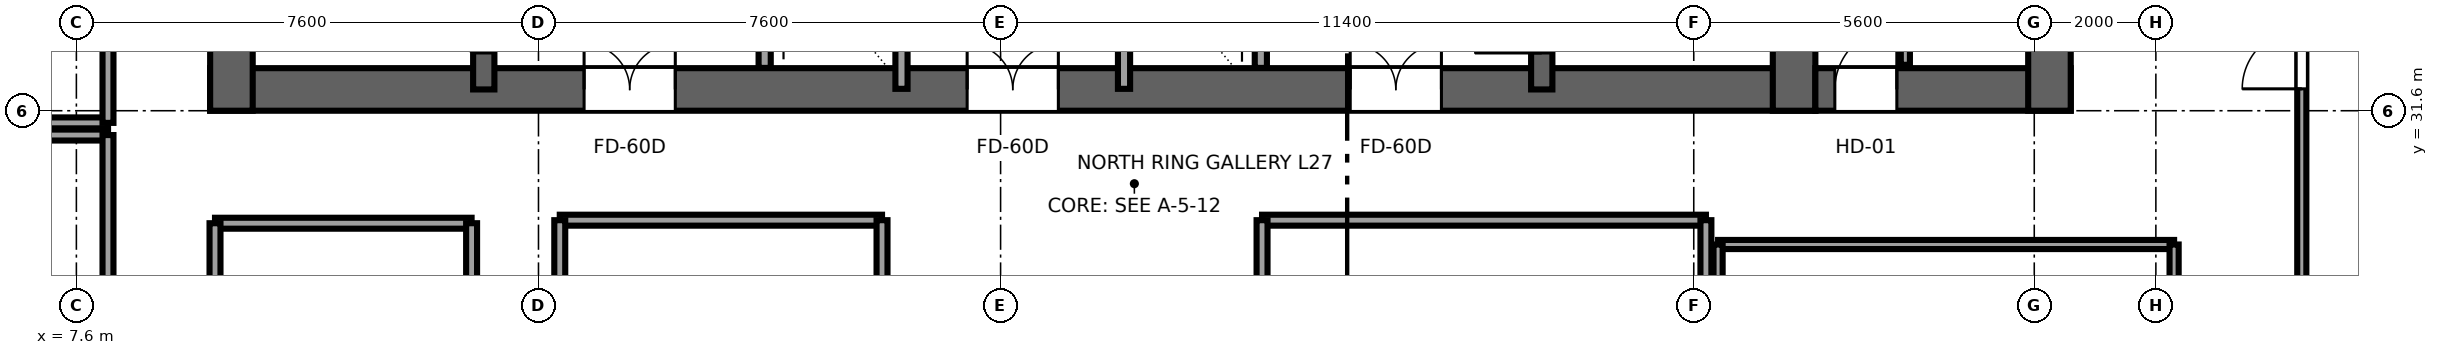
"""IFC4 building model, lengths in metres.
Left out: names, types, materials, properties, quantities, classifications, styles, units other than length and angle.
Written with IfcOpenShell. Run it as: python <this file> out.ifc"""

import sys

from ifc_helpers import new_model, si_unit, direction, frame, frame_2d, origin, place, context, subcontext, project, spatial, rectangle, extrude, source, transform, mapped, element, fill, save


model = new_model("IFC4")
c1 = context("Model", 3, precision=1e-05, world=origin(), true_north=direction((0.0, 1.0)))
c2 = subcontext(c1, "Body", "Model", "MODEL_VIEW")
j1 = project(units=[si_unit("LENGTHUNIT", "METRE"), si_unit("PLANEANGLEUNIT", "RADIAN")], contexts=[c1])
p1 = place(None, origin())
s1 = spatial("IfcSite", under=j1, at=p1, CompositionType="ELEMENT")
p2 = place(p1, origin())
s2 = spatial("IfcBuilding", under=s1, at=p2, CompositionType="ELEMENT")
p3 = place(p2, frame((0.0, 0.0, 108.0)))
s3 = spatial("IfcBuildingStorey", under=s2, at=p3, CompositionType="ELEMENT", Elevation=108.0)
p4 = place(p3, frame((9.8, 31.95, 0.0), z_axis=(0.0, 0.0, 1.0), x_axis=(1.0, 0.0, 0.0)))
e1 = element("IfcWall", 1, at=p4, inside=s3, PredefinedType="SHEAR", context=c2, shape_type="SweptSolid", body=[
    extrude(rectangle(XDim=26.4, YDim=0.7, at=frame_2d((13.2, 0.0))), origin(), (0.0, 0.0, 1.0), 3.55),
])
p5 = place(p4, frame((7.65, 0.0, 0.0), z_axis=(0.0, 0.0, 1.0), x_axis=(-1.0, 0.0, 0.0)))
e2 = element("IfcOpeningElement", 2, at=p5, cuts=e1, PredefinedType="OPENING", context=c2, shape_type="SweptSolid", body=[
    extrude(rectangle(XDim=1.5, YDim=2.04, at=frame_2d((0.75, 1.02))), frame((0.0, 0.36, 0.0), z_axis=(0.0, -1.0, 0.0), x_axis=(1.0, 0.0, 0.0)), (0.0, 0.0, 1.0), 0.72),
])
p6 = place(p4, frame((13.95, 0.0, 0.0), z_axis=(0.0, 0.0, 1.0), x_axis=(-1.0, 0.0, 0.0)))
e3 = element("IfcOpeningElement", 3, at=p6, cuts=e1, PredefinedType="OPENING", context=c2, shape_type="SweptSolid", body=[
    extrude(rectangle(XDim=1.5, YDim=2.04, at=frame_2d((0.75, 1.02))), frame((0.0, 0.36, 0.0), z_axis=(0.0, -1.0, 0.0), x_axis=(1.0, 0.0, 0.0)), (0.0, 0.0, 1.0), 0.72),
])
p7 = place(p4, frame((20.25, 0.0, 0.0), z_axis=(0.0, 0.0, 1.0), x_axis=(-1.0, 0.0, 0.0)))
e4 = element("IfcOpeningElement", 4, at=p7, cuts=e1, PredefinedType="OPENING", context=c2, shape_type="SweptSolid", body=[
    extrude(rectangle(XDim=1.5, YDim=2.04, at=frame_2d((0.75, 1.02))), frame((0.0, 0.36, 0.0), z_axis=(0.0, -1.0, 0.0), x_axis=(1.0, 0.0, 0.0)), (0.0, 0.0, 1.0), 0.72),
])
for number, where, z_axis, x_axis in (
    (5, (10.15, 31.6, 0.0), (0.0, 0.0, 1.0), (0.0, 1.0, 0.0)),
    (6, (35.85, 31.6, 0.0), (0.0, 0.0, 1.0), (0.0, 1.0, 0.0)),
):
    element("IfcWall", number, at=place(p3, frame(where, z_axis=z_axis, x_axis=x_axis)), inside=s3, PredefinedType="SHEAR", context=c2, shape_type="SweptSolid", body=[
        extrude(rectangle(XDim=13.6, YDim=0.7, at=frame_2d((6.8, 0.0))), origin(), (0.0, 0.0, 1.0), 3.55),
    ])
p8 = place(p3, frame((14.3, 31.95, 0.0), z_axis=(0.0, 0.0, 1.0), x_axis=(0.0, 1.0, 0.0)))
e7 = element("IfcWall", 7, at=p8, inside=s3, PredefinedType="SHEAR", context=c2, shape_type="SweptSolid", body=[
    extrude(rectangle(XDim=12.9, YDim=0.35, at=frame_2d((6.45, 0.0))), origin(), (0.0, 0.0, 1.0), 3.55),
])
p9 = place(p8, frame((0.6, 0.0, 0.0)))
e8 = element("IfcOpeningElement", 8, at=p9, cuts=e7, PredefinedType="OPENING", context=c2, shape_type="SweptSolid", body=[
    extrude(rectangle(XDim=1.1, YDim=2.12, at=frame_2d((0.55, 1.06))), frame((0.0, 0.185, 0.0), z_axis=(0.0, -1.0, 0.0), x_axis=(1.0, 0.0, 0.0)), (0.0, 0.0, 1.0), 0.37),
])
p10 = place(p3, frame((31.7, 31.95, 0.0), z_axis=(0.0, 0.0, 1.0), x_axis=(0.0, 1.0, 0.0)))
e9 = element("IfcWall", 9, at=p10, inside=s3, PredefinedType="SHEAR", context=c2, shape_type="SweptSolid", body=[
    extrude(rectangle(XDim=12.9, YDim=0.35, at=frame_2d((6.45, 0.0))), origin(), (0.0, 0.0, 1.0), 3.55),
])
p11 = place(p10, frame((1.7, 0.0, 0.0), z_axis=(0.0, 0.0, 1.0), x_axis=(-1.0, 0.0, 0.0)))
e10 = element("IfcOpeningElement", 10, at=p11, cuts=e9, PredefinedType="OPENING", context=c2, shape_type="SweptSolid", body=[
    extrude(rectangle(XDim=1.1, YDim=2.12, at=frame_2d((0.55, 1.06))), frame((0.0, 0.185, 0.0), z_axis=(0.0, -1.0, 0.0), x_axis=(1.0, 0.0, 0.0)), (0.0, 0.0, 1.0), 0.37),
])
p12 = place(p3, frame((36.2, 31.95, 0.0), z_axis=(0.0, 0.0, 1.0), x_axis=(1.0, 0.0, 0.0)))
e11 = element("IfcWall", 11, at=p12, inside=s3, PredefinedType="SHEAR", context=c2, shape_type="SweptSolid", body=[
    extrude(rectangle(XDim=4.2, YDim=0.7, at=frame_2d((2.1, 0.0))), origin(), (0.0, 0.0, 1.0), 3.55),
])
p13 = place(p12, frame((1.34, 0.0, 0.0), z_axis=(0.0, 0.0, 1.0), x_axis=(-1.0, 0.0, 0.0)))
e12 = element("IfcOpeningElement", 12, at=p13, cuts=e11, PredefinedType="OPENING", context=c2, shape_type="SweptSolid", body=[
    extrude(rectangle(XDim=1.02, YDim=2.03, at=frame_2d((0.51, 1.015))), frame((0.0, 0.36, 0.0), z_axis=(0.0, -1.0, 0.0), x_axis=(1.0, 0.0, 0.0)), (0.0, 0.0, 1.0), 0.72),
])
p14 = place(p3, frame((40.05, 31.6, 0.0), z_axis=(0.0, 0.0, 1.0), x_axis=(0.0, 1.0, 0.0)))
e13 = element("IfcWall", 13, at=p14, inside=s3, PredefinedType="SHEAR", context=c2, shape_type="SweptSolid", body=[
    extrude(rectangle(XDim=13.6, YDim=0.7, at=frame_2d((6.8, 0.0))), origin(), (0.0, 0.0, 1.0), 3.55),
])
for number, where, z_axis, x_axis in (
    (14, (18.92, 32.304, 0.0), (0.0, 0.0, 1.0), (0.0, 1.0, 0.0)),
    (15, (27.08, 32.304, 0.0), (0.0, 0.0, 1.0), (0.0, 1.0, 0.0)),
):
    element("IfcWall", number, at=place(p3, frame(where, z_axis=z_axis, x_axis=x_axis)), inside=s3, PredefinedType="SOLIDWALL", context=c2, shape_type="SweptSolid", body=[
        extrude(rectangle(XDim=3.846, YDim=0.2, at=frame_2d((1.923, 0.0))), origin(), (0.0, 0.0, 1.0), 3.37),
    ])
p15 = place(p3, frame((21.17, 31.96, 0.0), z_axis=(0.0, 0.0, 1.0), x_axis=(0.0, 1.0, 0.0)))
e16 = element("IfcWall", 16, at=p15, inside=s3, PredefinedType="SOLIDWALL", context=c2, shape_type="SweptSolid", body=[
    extrude(rectangle(XDim=12.58, YDim=0.2, at=frame_2d((6.29, 0.0))), origin(), (0.0, 0.0, 1.0), 3.37),
])
p16 = place(p15, frame((5.74, 0.0, 0.0)))
e17 = element("IfcOpeningElement", 17, at=p16, cuts=e16, PredefinedType="OPENING", context=c2, shape_type="SweptSolid", body=[
    extrude(rectangle(XDim=1.1, YDim=2.12, at=frame_2d((0.55, 1.06))), frame((0.0, 0.11, 0.0), z_axis=(0.0, -1.0, 0.0), x_axis=(1.0, 0.0, 0.0)), (0.0, 0.0, 1.0), 0.22),
])
p17 = place(p15, frame((8.24, 0.0, 0.0)))
e18 = element("IfcOpeningElement", 18, at=p17, cuts=e16, PredefinedType="OPENING", context=c2, shape_type="SweptSolid", body=[
    extrude(rectangle(XDim=1.1, YDim=2.12, at=frame_2d((0.55, 1.06))), frame((0.0, 0.11, 0.0), z_axis=(0.0, -1.0, 0.0), x_axis=(1.0, 0.0, 0.0)), (0.0, 0.0, 1.0), 0.22),
])
p18 = place(p3, frame((24.83, 31.96, 0.0), z_axis=(0.0, 0.0, 1.0), x_axis=(0.0, 1.0, 0.0)))
e19 = element("IfcWall", 19, at=p18, inside=s3, PredefinedType="SOLIDWALL", context=c2, shape_type="SweptSolid", body=[
    extrude(rectangle(XDim=12.58, YDim=0.2, at=frame_2d((6.29, 0.0))), origin(), (0.0, 0.0, 1.0), 3.37),
])
p19 = place(p18, frame((5.74, 0.0, 0.0)))
e20 = element("IfcOpeningElement", 20, at=p19, cuts=e19, PredefinedType="OPENING", context=c2, shape_type="SweptSolid", body=[
    extrude(rectangle(XDim=1.1, YDim=2.12, at=frame_2d((0.55, 1.06))), frame((0.0, 0.11, 0.0), z_axis=(0.0, -1.0, 0.0), x_axis=(1.0, 0.0, 0.0)), (0.0, 0.0, 1.0), 0.22),
])
p20 = place(p18, frame((8.24, 0.0, 0.0)))
e21 = element("IfcOpeningElement", 21, at=p20, cuts=e19, PredefinedType="OPENING", context=c2, shape_type="SweptSolid", body=[
    extrude(rectangle(XDim=1.1, YDim=2.12, at=frame_2d((0.55, 1.06))), frame((0.0, 0.11, 0.0), z_axis=(0.0, -1.0, 0.0), x_axis=(1.0, 0.0, 0.0)), (0.0, 0.0, 1.0), 0.22),
])
p21 = place(p3, frame((37.68, 32.355, 0.0), z_axis=(0.0, 0.0, 1.0), x_axis=(0.0, 1.0, 0.0)))
e22 = element("IfcWall", 22, at=p21, inside=s3, PredefinedType="PARTITIONING", context=c2, shape_type="SweptSolid", body=[
    extrude(rectangle(XDim=5.845, YDim=0.15, at=frame_2d((2.922, 0.0))), origin(), (0.0, 0.0, 1.0), 3.37),
])
p22 = place(p21, frame((2.413, 0.0, 0.0)))
e23 = element("IfcOpeningElement", 23, at=p22, cuts=e22, PredefinedType="OPENING", context=c2, shape_type="SweptSolid", body=[
    extrude(rectangle(XDim=1.02, YDim=2.03, at=frame_2d((0.51, 1.015))), frame((0.0, 0.085, 0.0), z_axis=(0.0, -1.0, 0.0), x_axis=(1.0, 0.0, 0.0)), (0.0, 0.0, 1.0), 0.17),
])
p23 = place(p3, frame((0.405, 31.2, 0.0), z_axis=(0.0, 0.0, 1.0), x_axis=(1.0, 0.0, 0.0)))
e24 = element("IfcWall", 24, at=p23, inside=s3, PredefinedType="PARTITIONING", context=c2, shape_type="SweptSolid", body=[
    extrude(rectangle(XDim=7.715, YDim=0.18, at=frame_2d((3.857, 0.0))), origin(), (0.0, 0.0, 1.0), 3.37),
])
p24 = place(p3, frame((8.12, 23.3, 0.0), z_axis=(0.0, 0.0, 1.0), x_axis=(0.0, 1.0, 0.0)))
e25 = element("IfcWall", 25, at=p24, inside=s3, PredefinedType="PARTITIONING", context=c2, shape_type="SweptSolid", body=[
    extrude(rectangle(XDim=7.9, YDim=0.18, at=frame_2d((3.95, 0.0))), origin(), (0.0, 0.0, 1.0), 3.37),
])
p25 = place(p24, frame((3.125, 0.0, 0.0)))
e26 = element("IfcOpeningElement", 26, at=p25, cuts=e25, PredefinedType="OPENING", context=c2, shape_type="SweptSolid", body=[
    extrude(rectangle(XDim=1.65, YDim=2.15, at=frame_2d((0.825, 1.075))), frame((0.0, 0.1, 0.0), z_axis=(0.0, -1.0, 0.0), x_axis=(1.0, 0.0, 0.0)), (0.0, 0.0, 1.0), 0.2),
])
p26 = place(p3, frame((0.405, 31.4, 0.0), z_axis=(0.0, 0.0, 1.0), x_axis=(1.0, 0.0, 0.0)))
e27 = element("IfcWall", 27, at=p26, inside=s3, PredefinedType="PARTITIONING", context=c2, shape_type="SweptSolid", body=[
    extrude(rectangle(XDim=7.715, YDim=0.18, at=frame_2d((3.857, 0.0))), origin(), (0.0, 0.0, 1.0), 3.37),
])
p27 = place(p3, frame((8.12, 31.4, 0.0), z_axis=(0.0, 0.0, 1.0), x_axis=(0.0, 1.0, 0.0)))
e28 = element("IfcWall", 28, at=p27, inside=s3, PredefinedType="PARTITIONING", context=c2, shape_type="SweptSolid", body=[
    extrude(rectangle(XDim=6.8, YDim=0.18, at=frame_2d((3.4, 0.0))), origin(), (0.0, 0.0, 1.0), 3.37),
])
p28 = place(p27, frame((3.175, 0.0, 0.0)))
e29 = element("IfcOpeningElement", 29, at=p28, cuts=e28, PredefinedType="OPENING", context=c2, shape_type="SweptSolid", body=[
    extrude(rectangle(XDim=1.65, YDim=2.15, at=frame_2d((0.825, 1.075))), frame((0.0, 0.1, 0.0), z_axis=(0.0, -1.0, 0.0), x_axis=(1.0, 0.0, 0.0)), (0.0, 0.0, 1.0), 0.2),
])
p29 = place(p3, frame((44.2, 27.38, 0.0), z_axis=(0.0, 0.0, 1.0), x_axis=(0.0, 1.0, 0.0)))
e30 = element("IfcWall", 30, at=p29, inside=s3, PredefinedType="PARTITIONING", context=c2, shape_type="SweptSolid", body=[
    extrude(rectangle(XDim=10.14, YDim=0.15, at=frame_2d((5.07, 0.0))), origin(), (0.0, 0.0, 1.0), 3.37),
])
p30 = place(p29, frame((4.58, 0.0, 0.0)))
e31 = element("IfcOpeningElement", 31, at=p30, cuts=e30, PredefinedType="OPENING", context=c2, shape_type="SweptSolid", body=[
    extrude(rectangle(XDim=0.98, YDim=2.12, at=frame_2d((0.49, 1.06))), frame((0.0, 0.085, 0.0), z_axis=(0.0, -1.0, 0.0), x_axis=(1.0, 0.0, 0.0)), (0.0, 0.0, 1.0), 0.17),
])
p31 = place(p3, frame((9.88, 29.75, 0.0), z_axis=(0.0, 0.0, 1.0), x_axis=(1.0, 0.0, 0.0)))
e32 = element("IfcWall", 32, at=p31, inside=s3, PredefinedType="PARTITIONING", context=c2, shape_type="SweptSolid", body=[
    extrude(rectangle(XDim=4.22, YDim=0.18, at=frame_2d((2.11, 0.0))), origin(), (0.0, 0.0, 1.0), 3.37),
])
for number, where, z_axis, x_axis in (
    (33, (9.88, 23.3, 0.0), (0.0, 0.0, 1.0), (0.0, 1.0, 0.0)),
    (34, (14.1, 23.3, 0.0), (0.0, 0.0, 1.0), (0.0, 1.0, 0.0)),
):
    element("IfcWall", number, at=place(p3, frame(where, z_axis=z_axis, x_axis=x_axis)), inside=s3, PredefinedType="PARTITIONING", context=c2, shape_type="SweptSolid", body=[
        extrude(rectangle(XDim=6.45, YDim=0.18, at=frame_2d((3.225, 0.0))), origin(), (0.0, 0.0, 1.0), 3.37),
    ])
p32 = place(p3, frame((27.1, 29.8, 0.0), z_axis=(0.0, 0.0, 1.0), x_axis=(1.0, 0.0, 0.0)))
e35 = element("IfcWall", 35, at=p32, inside=s3, PredefinedType="PARTITIONING", context=c2, shape_type="SweptSolid", body=[
    extrude(rectangle(XDim=7.3, YDim=0.18, at=frame_2d((3.65, 0.0))), origin(), (0.0, 0.0, 1.0), 3.37),
])
for number, where, z_axis, x_axis in (
    (36, (27.1, 23.3, 0.0), (0.0, 0.0, 1.0), (0.0, 1.0, 0.0)),
    (37, (34.4, 23.3, 0.0), (0.0, 0.0, 1.0), (0.0, 1.0, 0.0)),
):
    element("IfcWall", number, at=place(p3, frame(where, z_axis=z_axis, x_axis=x_axis)), inside=s3, PredefinedType="PARTITIONING", context=c2, shape_type="SweptSolid", body=[
        extrude(rectangle(XDim=6.5, YDim=0.18, at=frame_2d((3.25, 0.0))), origin(), (0.0, 0.0, 1.0), 3.37),
    ])
p33 = place(p3, frame((15.55, 29.8, 0.0), z_axis=(0.0, 0.0, 1.0), x_axis=(1.0, 0.0, 0.0)))
e38 = element("IfcWall", 38, at=p33, inside=s3, PredefinedType="PARTITIONING", context=c2, shape_type="SweptSolid", body=[
    extrude(rectangle(XDim=5.3, YDim=0.18, at=frame_2d((2.65, 0.0))), origin(), (0.0, 0.0, 1.0), 3.37),
])
for number, where, z_axis, x_axis in (
    (39, (15.55, 23.3, 0.0), (0.0, 0.0, 1.0), (0.0, 1.0, 0.0)),
    (40, (20.85, 23.3, 0.0), (0.0, 0.0, 1.0), (0.0, 1.0, 0.0)),
):
    element("IfcWall", number, at=place(p3, frame(where, z_axis=z_axis, x_axis=x_axis)), inside=s3, PredefinedType="PARTITIONING", context=c2, shape_type="SweptSolid", body=[
        extrude(rectangle(XDim=6.5, YDim=0.18, at=frame_2d((3.25, 0.0))), origin(), (0.0, 0.0, 1.0), 3.37),
    ])
p34 = place(p3, frame((34.6, 29.4, 0.0), z_axis=(0.0, 0.0, 1.0), x_axis=(1.0, 0.0, 0.0)))
e41 = element("IfcWall", 41, at=p34, inside=s3, PredefinedType="PARTITIONING", context=c2, shape_type="SweptSolid", body=[
    extrude(rectangle(XDim=7.5, YDim=0.15, at=frame_2d((3.75, 0.0))), origin(), (0.0, 0.0, 1.0), 3.37),
])
p35 = place(p3, frame((34.6, 23.3, 0.0), z_axis=(0.0, 0.0, 1.0), x_axis=(0.0, 1.0, 0.0)))
e42 = element("IfcWall", 42, at=p35, inside=s3, PredefinedType="PARTITIONING", context=c2, shape_type="SweptSolid", body=[
    extrude(rectangle(XDim=6.1, YDim=0.15, at=frame_2d((3.05, 0.0))), origin(), (0.0, 0.0, 1.0), 3.37),
])
p36 = place(p3, frame((42.1, 23.3, 0.0), z_axis=(0.0, 0.0, 1.0), x_axis=(0.0, 1.0, 0.0)))
e43 = element("IfcWall", 43, at=p36, inside=s3, PredefinedType="PARTITIONING", context=c2, shape_type="SweptSolid", body=[
    extrude(rectangle(XDim=6.1, YDim=0.15, at=frame_2d((3.05, 0.0))), origin(), (0.0, 0.0, 1.0), 2.16),
])
m1 = source(origin(), c2, "Body", "SweptSolid", [
    extrude(rectangle(XDim=1.1, YDim=2.12, at=frame_2d((0.55, 1.06))), frame((0.0, 0.025, 0.0), z_axis=(0.0, -1.0, 0.0), x_axis=(1.0, 0.0, 0.0)), (0.0, 0.0, 1.0), 0.05),
])
p37 = place(p9, origin())
e44 = element("IfcDoor", 44, at=p37, inside=s3, OperationType="SINGLE_SWING_RIGHT", PredefinedType="DOOR", context=c2, shape_type="MappedRepresentation", body=[
    mapped(m1, transform((0.0, 0.0, 0.0), x_axis=(1.0, 0.0, 0.0), y_axis=(0.0, 1.0, 0.0), z_axis=(0.0, 0.0, 1.0), scale=1.0)),
])
fill(e8, e44)
p38 = place(p11, origin())
e45 = element("IfcDoor", 45, at=p38, inside=s3, OperationType="SINGLE_SWING_LEFT", PredefinedType="DOOR", context=c2, shape_type="MappedRepresentation", body=[
    mapped(m1, transform((0.0, 0.0, 0.0), x_axis=(1.0, 0.0, 0.0), y_axis=(0.0, 1.0, 0.0), z_axis=(0.0, 0.0, 1.0), scale=1.0)),
])
fill(e10, e45)
m2 = source(origin(), c2, "Body", "SweptSolid", [
    extrude(rectangle(XDim=1.5, YDim=2.04, at=frame_2d((0.75, 1.02))), frame((0.0, 0.025, 0.0), z_axis=(0.0, -1.0, 0.0), x_axis=(1.0, 0.0, 0.0)), (0.0, 0.0, 1.0), 0.05),
])
p39 = place(p5, origin())
e46 = element("IfcDoor", 46, at=p39, inside=s3, OperationType="DOUBLE_DOOR_SINGLE_SWING", PredefinedType="DOOR", context=c2, shape_type="MappedRepresentation", body=[
    mapped(m2, transform((0.0, 0.0, 0.0), x_axis=(1.0, 0.0, 0.0), y_axis=(0.0, 1.0, 0.0), z_axis=(0.0, 0.0, 1.0), scale=1.0)),
])
fill(e2, e46)
p40 = place(p6, origin())
e47 = element("IfcDoor", 47, at=p40, inside=s3, OperationType="DOUBLE_DOOR_SINGLE_SWING", PredefinedType="DOOR", context=c2, shape_type="MappedRepresentation", body=[
    mapped(m2, transform((0.0, 0.0, 0.0), x_axis=(1.0, 0.0, 0.0), y_axis=(0.0, 1.0, 0.0), z_axis=(0.0, 0.0, 1.0), scale=1.0)),
])
fill(e3, e47)
p41 = place(p7, origin())
e48 = element("IfcDoor", 48, at=p41, inside=s3, OperationType="DOUBLE_DOOR_SINGLE_SWING", PredefinedType="DOOR", context=c2, shape_type="MappedRepresentation", body=[
    mapped(m2, transform((0.0, 0.0, 0.0), x_axis=(1.0, 0.0, 0.0), y_axis=(0.0, 1.0, 0.0), z_axis=(0.0, 0.0, 1.0), scale=1.0)),
])
fill(e4, e48)
m3 = source(origin(), c2, "Body", "SweptSolid", [
    extrude(rectangle(XDim=1.02, YDim=2.03, at=frame_2d((0.51, 1.015))), frame((0.0, 0.025, 0.0), z_axis=(0.0, -1.0, 0.0), x_axis=(1.0, 0.0, 0.0)), (0.0, 0.0, 1.0), 0.05),
])
p42 = place(p13, origin())
e49 = element("IfcDoor", 49, at=p42, inside=s3, OperationType="SINGLE_SWING_RIGHT", PredefinedType="DOOR", context=c2, shape_type="MappedRepresentation", body=[
    mapped(m3, transform((0.0, 0.0, 0.0), x_axis=(1.0, 0.0, 0.0), y_axis=(0.0, 1.0, 0.0), z_axis=(0.0, 0.0, 1.0), scale=1.0)),
])
fill(e12, e49)
m4 = source(origin(), c2, "Body", "SweptSolid", [
    extrude(rectangle(XDim=0.98, YDim=2.12, at=frame_2d((0.49, 1.06))), frame((0.0, 0.025, 0.0), z_axis=(0.0, -1.0, 0.0), x_axis=(1.0, 0.0, 0.0)), (0.0, 0.0, 1.0), 0.05),
])
p43 = place(p30, origin())
e50 = element("IfcDoor", 50, at=p43, inside=s3, OperationType="SINGLE_SWING_LEFT", PredefinedType="DOOR", context=c2, shape_type="MappedRepresentation", body=[
    mapped(m4, transform((0.0, 0.0, 0.0), x_axis=(1.0, 0.0, 0.0), y_axis=(0.0, 1.0, 0.0), z_axis=(0.0, 0.0, 1.0), scale=1.0)),
])
fill(e31, e50)
save(model, sys.argv[1])
